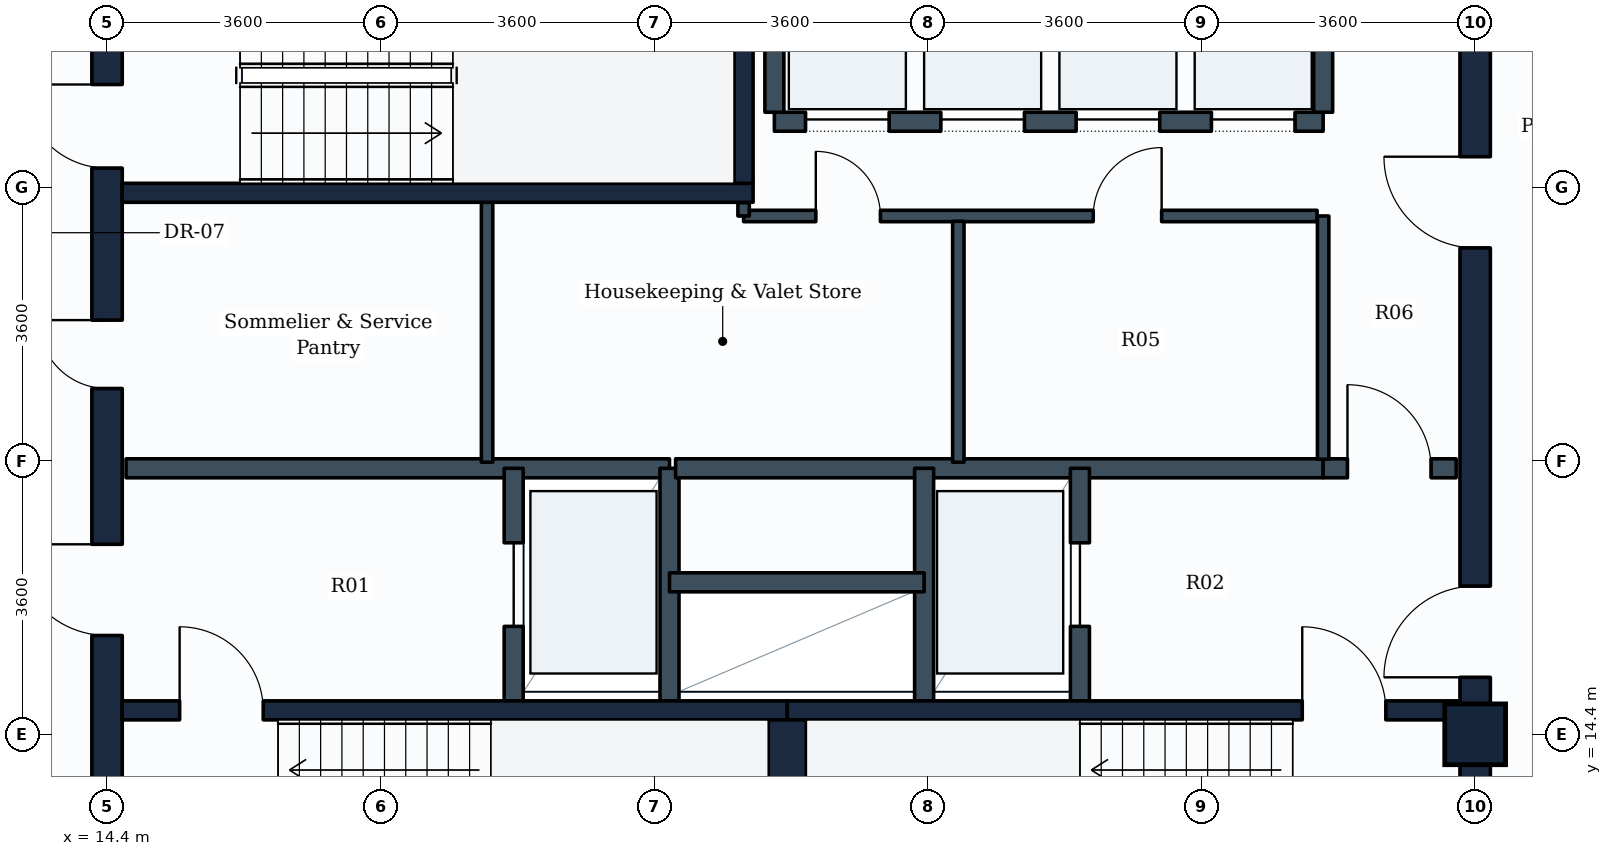
"""IFC4 building model, lengths in metres.
Left out: names, types, materials, properties, quantities, classifications, styles, units other than length and angle.
Written with IfcOpenShell. Run it as: python <this file> out.ifc"""

import sys

from ifc_helpers import new_model, si_unit, direction, frame, frame_2d, origin, origin_2d, place, context, subcontext, project, spatial, rectangle, extrude, element, fill, save


model = new_model("IFC4")
c1 = context("Model", 3, precision=1e-05, world=origin(), true_north=direction((0.0, 1.0)))
c2 = subcontext(c1, "Body", "Model", "MODEL_VIEW")
j1 = project(units=[si_unit("LENGTHUNIT", "METRE"), si_unit("PLANEANGLEUNIT", "RADIAN")], contexts=[c1])
p1 = place(None, origin())
s1 = spatial("IfcSite", under=j1, at=p1, CompositionType="ELEMENT")
p2 = place(p1, origin())
s2 = spatial("IfcBuilding", under=s1, at=p2, CompositionType="ELEMENT")
p3 = place(p2, frame((0.0, 0.0, 235.4)))
s3 = spatial("IfcBuildingStorey", under=s2, at=p3, CompositionType="ELEMENT", Elevation=235.4)
p4 = place(p3, frame((32.4, 14.4, 0.0), z_axis=(0.0, 0.0, 1.0), x_axis=(1.0, 0.0, 0.0)))
e1 = element("IfcColumn", 1, at=p4, inside=s3, PredefinedType="COLUMN", context=c2, shape_type="SweptSolid", body=[
    extrude(rectangle(XDim=0.8, YDim=0.8, at=origin_2d()), origin(), (0.0, 0.0, 1.0), 3.6),
])
p5 = place(p3, frame((14.4, 10.8, 0.0), z_axis=(0.0, 0.0, 1.0), x_axis=(0.0, 1.0, 0.0)))
e2 = element("IfcWall", 2, at=p5, inside=s3, PredefinedType="SHEAR", context=c2, shape_type="SweptSolid", body=[
    extrude(rectangle(XDim=14.4, YDim=0.4, at=frame_2d((7.2, 0.0))), origin(), (0.0, 0.0, 1.0), 3.35),
])
p6 = place(p5, frame((11.05, 0.0, 0.0)))
e3 = element("IfcOpeningElement", 3, at=p6, cuts=e2, PredefinedType="OPENING", context=c2, shape_type="SweptSolid", body=[
    extrude(rectangle(XDim=1.1, YDim=2.1, at=frame_2d((0.55, 1.05))), frame((0.0, 0.21, 0.0), z_axis=(0.0, -1.0, 0.0), x_axis=(1.0, 0.0, 0.0)), (0.0, 0.0, 1.0), 0.42),
])
p7 = place(p5, frame((4.9, 0.0, 0.0)))
e4 = element("IfcOpeningElement", 4, at=p7, cuts=e2, PredefinedType="OPENING", context=c2, shape_type="SweptSolid", body=[
    extrude(rectangle(XDim=1.2, YDim=2.1, at=frame_2d((0.6, 1.05))), frame((0.0, 0.21, 0.0), z_axis=(0.0, -1.0, 0.0), x_axis=(1.0, 0.0, 0.0)), (0.0, 0.0, 1.0), 0.42),
])
p8 = place(p5, frame((8.15, 0.0, 0.0)))
e5 = element("IfcOpeningElement", 5, at=p8, cuts=e2, PredefinedType="OPENING", context=c2, shape_type="SweptSolid", body=[
    extrude(rectangle(XDim=0.9, YDim=2.1, at=frame_2d((0.45, 1.05))), frame((0.0, 0.21, 0.0), z_axis=(0.0, -1.0, 0.0), x_axis=(1.0, 0.0, 0.0)), (0.0, 0.0, 1.0), 0.42),
])
p9 = place(p3, frame((32.4, 10.8, 0.0), z_axis=(0.0, 0.0, 1.0), x_axis=(0.0, 1.0, 0.0)))
e6 = element("IfcWall", 6, at=p9, inside=s3, PredefinedType="SHEAR", context=c2, shape_type="SweptSolid", body=[
    extrude(rectangle(XDim=14.4, YDim=0.4, at=frame_2d((7.2, 0.0))), origin(), (0.0, 0.0, 1.0), 3.35),
])
p10 = place(p9, frame((4.35, 0.0, 0.0)))
e7 = element("IfcOpeningElement", 7, at=p10, cuts=e6, PredefinedType="OPENING", context=c2, shape_type="SweptSolid", body=[
    extrude(rectangle(XDim=1.2, YDim=2.1, at=frame_2d((0.6, 1.05))), frame((0.0, 0.21, 0.0), z_axis=(0.0, -1.0, 0.0), x_axis=(1.0, 0.0, 0.0)), (0.0, 0.0, 1.0), 0.42),
])
p11 = place(p9, frame((10.0, 0.0, 0.0)))
e8 = element("IfcOpeningElement", 8, at=p11, cuts=e6, PredefinedType="OPENING", context=c2, shape_type="SweptSolid", body=[
    extrude(rectangle(XDim=1.2, YDim=2.1, at=frame_2d((0.6, 1.05))), frame((0.0, 0.21, 0.0), z_axis=(0.0, -1.0, 0.0), x_axis=(1.0, 0.0, 0.0)), (0.0, 0.0, 1.0), 0.42),
])
p12 = place(p3, frame((14.6, 14.715, 0.0), z_axis=(0.0, 0.0, 1.0), x_axis=(1.0, 0.0, 0.0)))
e9 = element("IfcWall", 9, at=p12, inside=s3, PredefinedType="SHEAR", context=c2, shape_type="SweptSolid", body=[
    extrude(rectangle(XDim=8.75, YDim=0.25, at=frame_2d((4.375, 0.0))), origin(), (0.0, 0.0, 1.0), 3.35),
])
p13 = place(p12, frame((0.755, 0.0, 0.0)))
e10 = element("IfcOpeningElement", 10, at=p13, cuts=e9, PredefinedType="OPENING", context=c2, shape_type="SweptSolid", body=[
    extrude(rectangle(XDim=1.1, YDim=2.1, at=frame_2d((0.55, 1.05))), frame((0.0, 0.135, 0.0), z_axis=(0.0, -1.0, 0.0), x_axis=(1.0, 0.0, 0.0)), (0.0, 0.0, 1.0), 0.27),
])
p14 = place(p3, frame((23.35, 14.715, 0.0), z_axis=(0.0, 0.0, 1.0), x_axis=(1.0, 0.0, 0.0)))
e11 = element("IfcWall", 11, at=p14, inside=s3, PredefinedType="SHEAR", context=c2, shape_type="SweptSolid", body=[
    extrude(rectangle(XDim=8.85, YDim=0.25, at=frame_2d((4.425, 0.0))), origin(), (0.0, 0.0, 1.0), 3.35),
])
p15 = place(p14, frame((6.775, 0.0, 0.0)))
e12 = element("IfcOpeningElement", 12, at=p15, cuts=e11, PredefinedType="OPENING", context=c2, shape_type="SweptSolid", body=[
    extrude(rectangle(XDim=1.1, YDim=2.1, at=frame_2d((0.55, 1.05))), frame((0.0, 0.135, 0.0), z_axis=(0.0, -1.0, 0.0), x_axis=(1.0, 0.0, 0.0)), (0.0, 0.0, 1.0), 0.27),
])
p16 = place(p3, frame((23.35, 11.75, 0.0), z_axis=(0.0, 0.0, 1.0), x_axis=(0.0, 1.0, 0.0)))
e13 = element("IfcWall", 13, at=p16, inside=s3, PredefinedType="SHEAR", context=c2, shape_type="SweptSolid", body=[
    extrude(rectangle(XDim=2.84, YDim=0.5, at=frame_2d((1.42, 0.0))), origin(), (0.0, 0.0, 1.0), 3.35),
])
p17 = place(p3, frame((14.6, 21.525, 0.0), z_axis=(0.0, 0.0, 1.0), x_axis=(1.0, 0.0, 0.0)))
e14 = element("IfcWall", 14, at=p17, inside=s3, PredefinedType="SHEAR", context=c2, shape_type="SweptSolid", body=[
    extrude(rectangle(XDim=8.3, YDim=0.25, at=frame_2d((4.15, 0.0))), origin(), (0.0, 0.0, 1.0), 3.35),
])
p18 = place(p3, frame((22.775, 21.65, 0.0), z_axis=(0.0, 0.0, 1.0), x_axis=(0.0, 1.0, 0.0)))
e15 = element("IfcWall", 15, at=p18, inside=s3, PredefinedType="SHEAR", context=c2, shape_type="SweptSolid", body=[
    extrude(rectangle(XDim=2.84, YDim=0.25, at=frame_2d((1.42, 0.0))), origin(), (0.0, 0.0, 1.0), 3.35),
])
p19 = place(p3, frame((14.65, 17.9, 0.0), z_axis=(0.0, 0.0, 1.0), x_axis=(1.0, 0.0, 0.0)))
e16 = element("IfcWall", 16, at=p19, inside=s3, PredefinedType="PARTITIONING", context=c2, shape_type="SweptSolid", body=[
    extrude(rectangle(XDim=7.15, YDim=0.25, at=frame_2d((3.575, 0.0))), origin(), (0.0, 0.0, 1.0), 3.335),
])
p20 = place(p3, frame((19.75, 14.84, 0.0), z_axis=(0.0, 0.0, 1.0), x_axis=(0.0, 1.0, 0.0)))
e17 = element("IfcWall", 17, at=p20, inside=s3, PredefinedType="PARTITIONING", context=c2, shape_type="SweptSolid", body=[
    extrude(rectangle(XDim=3.06, YDim=0.25, at=frame_2d((1.53, 0.0))), origin(), (0.0, 0.0, 1.0), 3.335),
])
p21 = place(p20, frame((0.98, 0.0, 0.0)))
e18 = element("IfcOpeningElement", 18, at=p21, cuts=e17, PredefinedType="OPENING", context=c2, shape_type="SweptSolid", body=[
    extrude(rectangle(XDim=1.1, YDim=2.1, at=frame_2d((0.55, 1.05))), frame((0.0, 0.135, 0.0), z_axis=(0.0, -1.0, 0.0), x_axis=(1.0, 0.0, 0.0)), (0.0, 0.0, 1.0), 0.27),
])
p22 = place(p3, frame((21.8, 14.84, 0.0), z_axis=(0.0, 0.0, 1.0), x_axis=(0.0, 1.0, 0.0)))
e19 = element("IfcWall", 19, at=p22, inside=s3, PredefinedType="PARTITIONING", context=c2, shape_type="SweptSolid", body=[
    extrude(rectangle(XDim=3.06, YDim=0.25, at=frame_2d((1.53, 0.0))), origin(), (0.0, 0.0, 1.0), 3.335),
])
p23 = place(p3, frame((21.88, 17.9, 0.0), z_axis=(0.0, 0.0, 1.0), x_axis=(1.0, 0.0, 0.0)))
e20 = element("IfcWall", 20, at=p23, inside=s3, PredefinedType="PARTITIONING", context=c2, shape_type="SweptSolid", body=[
    extrude(rectangle(XDim=8.52, YDim=0.25, at=frame_2d((4.26, 0.0))), origin(), (0.0, 0.0, 1.0), 3.335),
])
p24 = place(p3, frame((30.4, 17.9, 0.0), z_axis=(0.0, 0.0, 1.0), x_axis=(1.0, 0.0, 0.0)))
e21 = element("IfcWall", 21, at=p24, inside=s3, PredefinedType="PARTITIONING", context=c2, shape_type="SweptSolid", body=[
    extrude(rectangle(XDim=1.75, YDim=0.25, at=frame_2d((0.875, 0.0))), origin(), (0.0, 0.0, 1.0), 3.335),
])
p25 = place(p24, frame((0.32, 0.0, 0.0)))
e22 = element("IfcOpeningElement", 22, at=p25, cuts=e21, PredefinedType="OPENING", context=c2, shape_type="SweptSolid", body=[
    extrude(rectangle(XDim=1.1, YDim=2.1, at=frame_2d((0.55, 1.05))), frame((0.0, 0.135, 0.0), z_axis=(0.0, -1.0, 0.0), x_axis=(1.0, 0.0, 0.0)), (0.0, 0.0, 1.0), 0.27),
])
p26 = place(p3, frame((25.15, 14.84, 0.0), z_axis=(0.0, 0.0, 1.0), x_axis=(0.0, 1.0, 0.0)))
e23 = element("IfcWall", 23, at=p26, inside=s3, PredefinedType="PARTITIONING", context=c2, shape_type="SweptSolid", body=[
    extrude(rectangle(XDim=3.06, YDim=0.25, at=frame_2d((1.53, 0.0))), origin(), (0.0, 0.0, 1.0), 3.335),
])
p27 = place(p3, frame((27.2, 14.84, 0.0), z_axis=(0.0, 0.0, 1.0), x_axis=(0.0, 1.0, 0.0)))
e24 = element("IfcWall", 24, at=p27, inside=s3, PredefinedType="PARTITIONING", context=c2, shape_type="SweptSolid", body=[
    extrude(rectangle(XDim=3.06, YDim=0.25, at=frame_2d((1.53, 0.0))), origin(), (0.0, 0.0, 1.0), 3.335),
])
p28 = place(p27, frame((0.98, 0.0, 0.0)))
e25 = element("IfcOpeningElement", 25, at=p28, cuts=e24, PredefinedType="OPENING", context=c2, shape_type="SweptSolid", body=[
    extrude(rectangle(XDim=1.1, YDim=2.1, at=frame_2d((0.55, 1.05))), frame((0.0, 0.135, 0.0), z_axis=(0.0, -1.0, 0.0), x_axis=(1.0, 0.0, 0.0)), (0.0, 0.0, 1.0), 0.27),
])
p29 = place(p3, frame((21.8, 16.4, 0.0), z_axis=(0.0, 0.0, 1.0), x_axis=(1.0, 0.0, 0.0)))
e26 = element("IfcWall", 26, at=p29, inside=s3, PredefinedType="PARTITIONING", context=c2, shape_type="SweptSolid", body=[
    extrude(rectangle(XDim=3.35, YDim=0.25, at=frame_2d((1.675, 0.0))), origin(), (0.0, 0.0, 1.0), 3.335),
])
p30 = place(p3, frame((23.18, 22.46, 0.0), z_axis=(0.0, 0.0, 1.0), x_axis=(1.0, 0.0, 0.0)))
e27 = element("IfcWall", 27, at=p30, inside=s3, PredefinedType="PARTITIONING", context=c2, shape_type="SweptSolid", body=[
    extrude(rectangle(XDim=7.22, YDim=0.25, at=frame_2d((3.61, 0.0))), origin(), (0.0, 0.0, 1.0), 3.335),
])
p31 = place(p30, frame((0.41, 0.0, 0.0)))
e28 = element("IfcOpeningElement", 28, at=p31, cuts=e27, PredefinedType="OPENING", context=c2, shape_type="SweptSolid", body=[
    extrude(rectangle(XDim=1.1, YDim=2.1, at=frame_2d((0.55, 1.05))), frame((0.0, 0.135, 0.0), z_axis=(0.0, -1.0, 0.0), x_axis=(1.0, 0.0, 0.0)), (0.0, 0.0, 1.0), 0.27),
])
p32 = place(p30, frame((2.19, 0.0, 0.0)))
e29 = element("IfcOpeningElement", 29, at=p32, cuts=e27, PredefinedType="OPENING", context=c2, shape_type="SweptSolid", body=[
    extrude(rectangle(XDim=1.1, YDim=2.1, at=frame_2d((0.55, 1.05))), frame((0.0, 0.135, 0.0), z_axis=(0.0, -1.0, 0.0), x_axis=(1.0, 0.0, 0.0)), (0.0, 0.0, 1.0), 0.27),
])
p33 = place(p30, frame((3.97, 0.0, 0.0)))
e30 = element("IfcOpeningElement", 30, at=p33, cuts=e27, PredefinedType="OPENING", context=c2, shape_type="SweptSolid", body=[
    extrude(rectangle(XDim=1.1, YDim=2.1, at=frame_2d((0.55, 1.05))), frame((0.0, 0.135, 0.0), z_axis=(0.0, -1.0, 0.0), x_axis=(1.0, 0.0, 0.0)), (0.0, 0.0, 1.0), 0.27),
])
p34 = place(p30, frame((5.75, 0.0, 0.0)))
e31 = element("IfcOpeningElement", 31, at=p34, cuts=e27, PredefinedType="OPENING", context=c2, shape_type="SweptSolid", body=[
    extrude(rectangle(XDim=1.1, YDim=2.1, at=frame_2d((0.55, 1.05))), frame((0.0, 0.135, 0.0), z_axis=(0.0, -1.0, 0.0), x_axis=(1.0, 0.0, 0.0)), (0.0, 0.0, 1.0), 0.27),
])
for number, where, z_axis, x_axis in (
    (32, (23.18, 22.585, 0.0), (0.0, 0.0, 1.0), (0.0, 1.0, 0.0)),
    (33, (30.4, 22.585, 0.0), (0.0, 0.0, 1.0), (0.0, 1.0, 0.0)),
):
    element("IfcWall", number, at=place(p3, frame(where, z_axis=z_axis, x_axis=x_axis)), inside=s3, PredefinedType="PARTITIONING", context=c2, shape_type="SweptSolid", body=[
        extrude(rectangle(XDim=2.315, YDim=0.25, at=frame_2d((1.157, 0.0))), origin(), (0.0, 0.0, 1.0), 3.335),
    ])
p35 = place(p3, frame((22.775, 21.22, 0.0), z_axis=(0.0, 0.0, 1.0), x_axis=(1.0, 0.0, 0.0)))
e34 = element("IfcWall", 34, at=p35, inside=s3, PredefinedType="PARTITIONING", context=c2, shape_type="SweptSolid", body=[
    extrude(rectangle(XDim=7.545, YDim=0.15, at=frame_2d((3.772, 0.0))), origin(), (0.0, 0.0, 1.0), 3.335),
])
p36 = place(p35, frame((0.95, 0.0, 0.0)))
e35 = element("IfcOpeningElement", 35, at=p36, cuts=e34, PredefinedType="OPENING", context=c2, shape_type="SweptSolid", body=[
    extrude(rectangle(XDim=0.85, YDim=2.1, at=frame_2d((0.425, 1.05))), frame((0.0, 0.085, 0.0), z_axis=(0.0, -1.0, 0.0), x_axis=(1.0, 0.0, 0.0)), (0.0, 0.0, 1.0), 0.17),
])
p37 = place(p35, frame((4.6, 0.0, 0.0)))
e36 = element("IfcOpeningElement", 36, at=p37, cuts=e34, PredefinedType="OPENING", context=c2, shape_type="SweptSolid", body=[
    extrude(rectangle(XDim=0.9, YDim=2.1, at=frame_2d((0.45, 1.05))), frame((0.0, 0.085, 0.0), z_axis=(0.0, -1.0, 0.0), x_axis=(1.0, 0.0, 0.0)), (0.0, 0.0, 1.0), 0.17),
])
p38 = place(p3, frame((22.775, 21.22, 0.0), z_axis=(0.0, 0.0, 1.0), x_axis=(0.0, 1.0, 0.0)))
e37 = element("IfcWall", 37, at=p38, inside=s3, PredefinedType="PARTITIONING", context=c2, shape_type="SweptSolid", body=[
    extrude(rectangle(XDim=0.175, YDim=0.15, at=frame_2d((0.087, 0.0))), origin(), (0.0, 0.0, 1.0), 3.335),
])
p39 = place(p3, frame((30.4, 18.02, 0.0), z_axis=(0.0, 0.0, 1.0), x_axis=(0.0, 1.0, 0.0)))
e38 = element("IfcWall", 38, at=p39, inside=s3, PredefinedType="PARTITIONING", context=c2, shape_type="SweptSolid", body=[
    extrude(rectangle(XDim=3.2, YDim=0.15, at=frame_2d((1.6, 0.0))), origin(), (0.0, 0.0, 1.0), 3.335),
])
p40 = place(p3, frame((19.4, 17.98, 0.0), z_axis=(0.0, 0.0, 1.0), x_axis=(0.0, 1.0, 0.0)))
e39 = element("IfcWall", 39, at=p40, inside=s3, PredefinedType="PARTITIONING", context=c2, shape_type="SweptSolid", body=[
    extrude(rectangle(XDim=3.42, YDim=0.15, at=frame_2d((1.71, 0.0))), origin(), (0.0, 0.0, 1.0), 3.335),
])
p41 = place(p3, frame((25.6, 17.98, 0.0), z_axis=(0.0, 0.0, 1.0), x_axis=(0.0, 1.0, 0.0)))
e40 = element("IfcWall", 40, at=p41, inside=s3, PredefinedType="PARTITIONING", context=c2, shape_type="SweptSolid", body=[
    extrude(rectangle(XDim=3.17, YDim=0.15, at=frame_2d((1.585, 0.0))), origin(), (0.0, 0.0, 1.0), 3.335),
])
p42 = place(p13, origin())
e41 = element("IfcDoor", 41, at=p42, inside=s3, OperationType="SINGLE_SWING_LEFT", PredefinedType="DOOR", context=c2, shape_type="SweptSolid", body=[
    extrude(rectangle(XDim=1.1, YDim=2.1, at=frame_2d((0.55, 1.05))), frame((0.0, 0.025, 0.0), z_axis=(0.0, -1.0, 0.0), x_axis=(1.0, 0.0, 0.0)), (0.0, 0.0, 1.0), 0.05),
])
fill(e10, e41)
p43 = place(p15, origin())
e42 = element("IfcDoor", 42, at=p43, inside=s3, OperationType="SINGLE_SWING_LEFT", PredefinedType="DOOR", context=c2, shape_type="SweptSolid", body=[
    extrude(rectangle(XDim=1.1, YDim=2.1, at=frame_2d((0.55, 1.05))), frame((0.0, 0.025, 0.0), z_axis=(0.0, -1.0, 0.0), x_axis=(1.0, 0.0, 0.0)), (0.0, 0.0, 1.0), 0.05),
])
fill(e12, e42)
p44 = place(p6, origin())
e43 = element("IfcDoor", 43, at=p44, inside=s3, OperationType="SINGLE_SWING_RIGHT", PredefinedType="DOOR", context=c2, shape_type="SweptSolid", body=[
    extrude(rectangle(XDim=1.1, YDim=2.1, at=frame_2d((0.55, 1.05))), frame((0.0, 0.025, 0.0), z_axis=(0.0, -1.0, 0.0), x_axis=(1.0, 0.0, 0.0)), (0.0, 0.0, 1.0), 0.05),
])
fill(e3, e43)
p45 = place(p21, origin())
e44 = element("IfcDoor", 44, at=p45, inside=s3, OperationType="SLIDING_TO_LEFT", PredefinedType="DOOR", context=c2, shape_type="SweptSolid", body=[
    extrude(rectangle(XDim=1.1, YDim=2.1, at=frame_2d((0.55, 1.05))), frame((0.0, 0.025, 0.0), z_axis=(0.0, -1.0, 0.0), x_axis=(1.0, 0.0, 0.0)), (0.0, 0.0, 1.0), 0.05),
])
fill(e18, e44)
p46 = place(p28, origin())
e45 = element("IfcDoor", 45, at=p46, inside=s3, OperationType="SLIDING_TO_LEFT", PredefinedType="DOOR", context=c2, shape_type="SweptSolid", body=[
    extrude(rectangle(XDim=1.1, YDim=2.1, at=frame_2d((0.55, 1.05))), frame((0.0, 0.025, 0.0), z_axis=(0.0, -1.0, 0.0), x_axis=(1.0, 0.0, 0.0)), (0.0, 0.0, 1.0), 0.05),
])
fill(e25, e45)
p47 = place(p7, origin())
e46 = element("IfcDoor", 46, at=p47, inside=s3, OperationType="SINGLE_SWING_RIGHT", PredefinedType="DOOR", context=c2, shape_type="SweptSolid", body=[
    extrude(rectangle(XDim=1.2, YDim=2.1, at=frame_2d((0.6, 1.05))), frame((0.0, 0.025, 0.0), z_axis=(0.0, -1.0, 0.0), x_axis=(1.0, 0.0, 0.0)), (0.0, 0.0, 1.0), 0.05),
])
fill(e4, e46)
p48 = place(p10, origin())
e47 = element("IfcDoor", 47, at=p48, inside=s3, OperationType="SINGLE_SWING_LEFT", PredefinedType="DOOR", context=c2, shape_type="SweptSolid", body=[
    extrude(rectangle(XDim=1.2, YDim=2.1, at=frame_2d((0.6, 1.05))), frame((0.0, 0.025, 0.0), z_axis=(0.0, -1.0, 0.0), x_axis=(1.0, 0.0, 0.0)), (0.0, 0.0, 1.0), 0.05),
])
fill(e7, e47)
p49 = place(p25, origin())
e48 = element("IfcDoor", 48, at=p49, inside=s3, OperationType="SINGLE_SWING_LEFT", PredefinedType="DOOR", context=c2, shape_type="SweptSolid", body=[
    extrude(rectangle(XDim=1.1, YDim=2.1, at=frame_2d((0.55, 1.05))), frame((0.0, 0.025, 0.0), z_axis=(0.0, -1.0, 0.0), x_axis=(1.0, 0.0, 0.0)), (0.0, 0.0, 1.0), 0.05),
])
fill(e22, e48)
p50 = place(p31, origin())
e49 = element("IfcDoor", 49, at=p50, inside=s3, OperationType="SLIDING_TO_LEFT", PredefinedType="DOOR", context=c2, shape_type="SweptSolid", body=[
    extrude(rectangle(XDim=1.1, YDim=2.1, at=frame_2d((0.55, 1.05))), frame((0.0, 0.025, 0.0), z_axis=(0.0, -1.0, 0.0), x_axis=(1.0, 0.0, 0.0)), (0.0, 0.0, 1.0), 0.05),
])
fill(e28, e49)
p51 = place(p32, origin())
e50 = element("IfcDoor", 50, at=p51, inside=s3, OperationType="SLIDING_TO_LEFT", PredefinedType="DOOR", context=c2, shape_type="SweptSolid", body=[
    extrude(rectangle(XDim=1.1, YDim=2.1, at=frame_2d((0.55, 1.05))), frame((0.0, 0.025, 0.0), z_axis=(0.0, -1.0, 0.0), x_axis=(1.0, 0.0, 0.0)), (0.0, 0.0, 1.0), 0.05),
])
fill(e29, e50)
p52 = place(p33, origin())
e51 = element("IfcDoor", 51, at=p52, inside=s3, OperationType="SLIDING_TO_LEFT", PredefinedType="DOOR", context=c2, shape_type="SweptSolid", body=[
    extrude(rectangle(XDim=1.1, YDim=2.1, at=frame_2d((0.55, 1.05))), frame((0.0, 0.025, 0.0), z_axis=(0.0, -1.0, 0.0), x_axis=(1.0, 0.0, 0.0)), (0.0, 0.0, 1.0), 0.05),
])
fill(e30, e51)
p53 = place(p34, origin())
e52 = element("IfcDoor", 52, at=p53, inside=s3, OperationType="SLIDING_TO_LEFT", PredefinedType="DOOR", context=c2, shape_type="SweptSolid", body=[
    extrude(rectangle(XDim=1.1, YDim=2.1, at=frame_2d((0.55, 1.05))), frame((0.0, 0.025, 0.0), z_axis=(0.0, -1.0, 0.0), x_axis=(1.0, 0.0, 0.0)), (0.0, 0.0, 1.0), 0.05),
])
fill(e31, e52)
p54 = place(p11, origin())
e53 = element("IfcDoor", 53, at=p54, inside=s3, OperationType="SINGLE_SWING_RIGHT", PredefinedType="DOOR", context=c2, shape_type="SweptSolid", body=[
    extrude(rectangle(XDim=1.2, YDim=2.1, at=frame_2d((0.6, 1.05))), frame((0.0, 0.025, 0.0), z_axis=(0.0, -1.0, 0.0), x_axis=(1.0, 0.0, 0.0)), (0.0, 0.0, 1.0), 0.05),
])
fill(e8, e53)
p55 = place(p8, origin())
e54 = element("IfcDoor", 54, at=p55, inside=s3, OperationType="SINGLE_SWING_RIGHT", PredefinedType="DOOR", context=c2, shape_type="SweptSolid", body=[
    extrude(rectangle(XDim=0.9, YDim=2.1, at=frame_2d((0.45, 1.05))), frame((0.0, 0.025, 0.0), z_axis=(0.0, -1.0, 0.0), x_axis=(1.0, 0.0, 0.0)), (0.0, 0.0, 1.0), 0.05),
])
fill(e5, e54)
p56 = place(p36, origin())
e55 = element("IfcDoor", 55, at=p56, inside=s3, OperationType="SINGLE_SWING_LEFT", PredefinedType="DOOR", context=c2, shape_type="SweptSolid", body=[
    extrude(rectangle(XDim=0.85, YDim=2.1, at=frame_2d((0.425, 1.05))), frame((0.0, 0.025, 0.0), z_axis=(0.0, -1.0, 0.0), x_axis=(1.0, 0.0, 0.0)), (0.0, 0.0, 1.0), 0.05),
])
fill(e35, e55)
p57 = place(p37, origin())
e56 = element("IfcDoor", 56, at=p57, inside=s3, OperationType="SINGLE_SWING_RIGHT", PredefinedType="DOOR", context=c2, shape_type="SweptSolid", body=[
    extrude(rectangle(XDim=0.9, YDim=2.1, at=frame_2d((0.45, 1.05))), frame((0.0, 0.025, 0.0), z_axis=(0.0, -1.0, 0.0), x_axis=(1.0, 0.0, 0.0)), (0.0, 0.0, 1.0), 0.05),
])
fill(e36, e56)
save(model, sys.argv[1])
